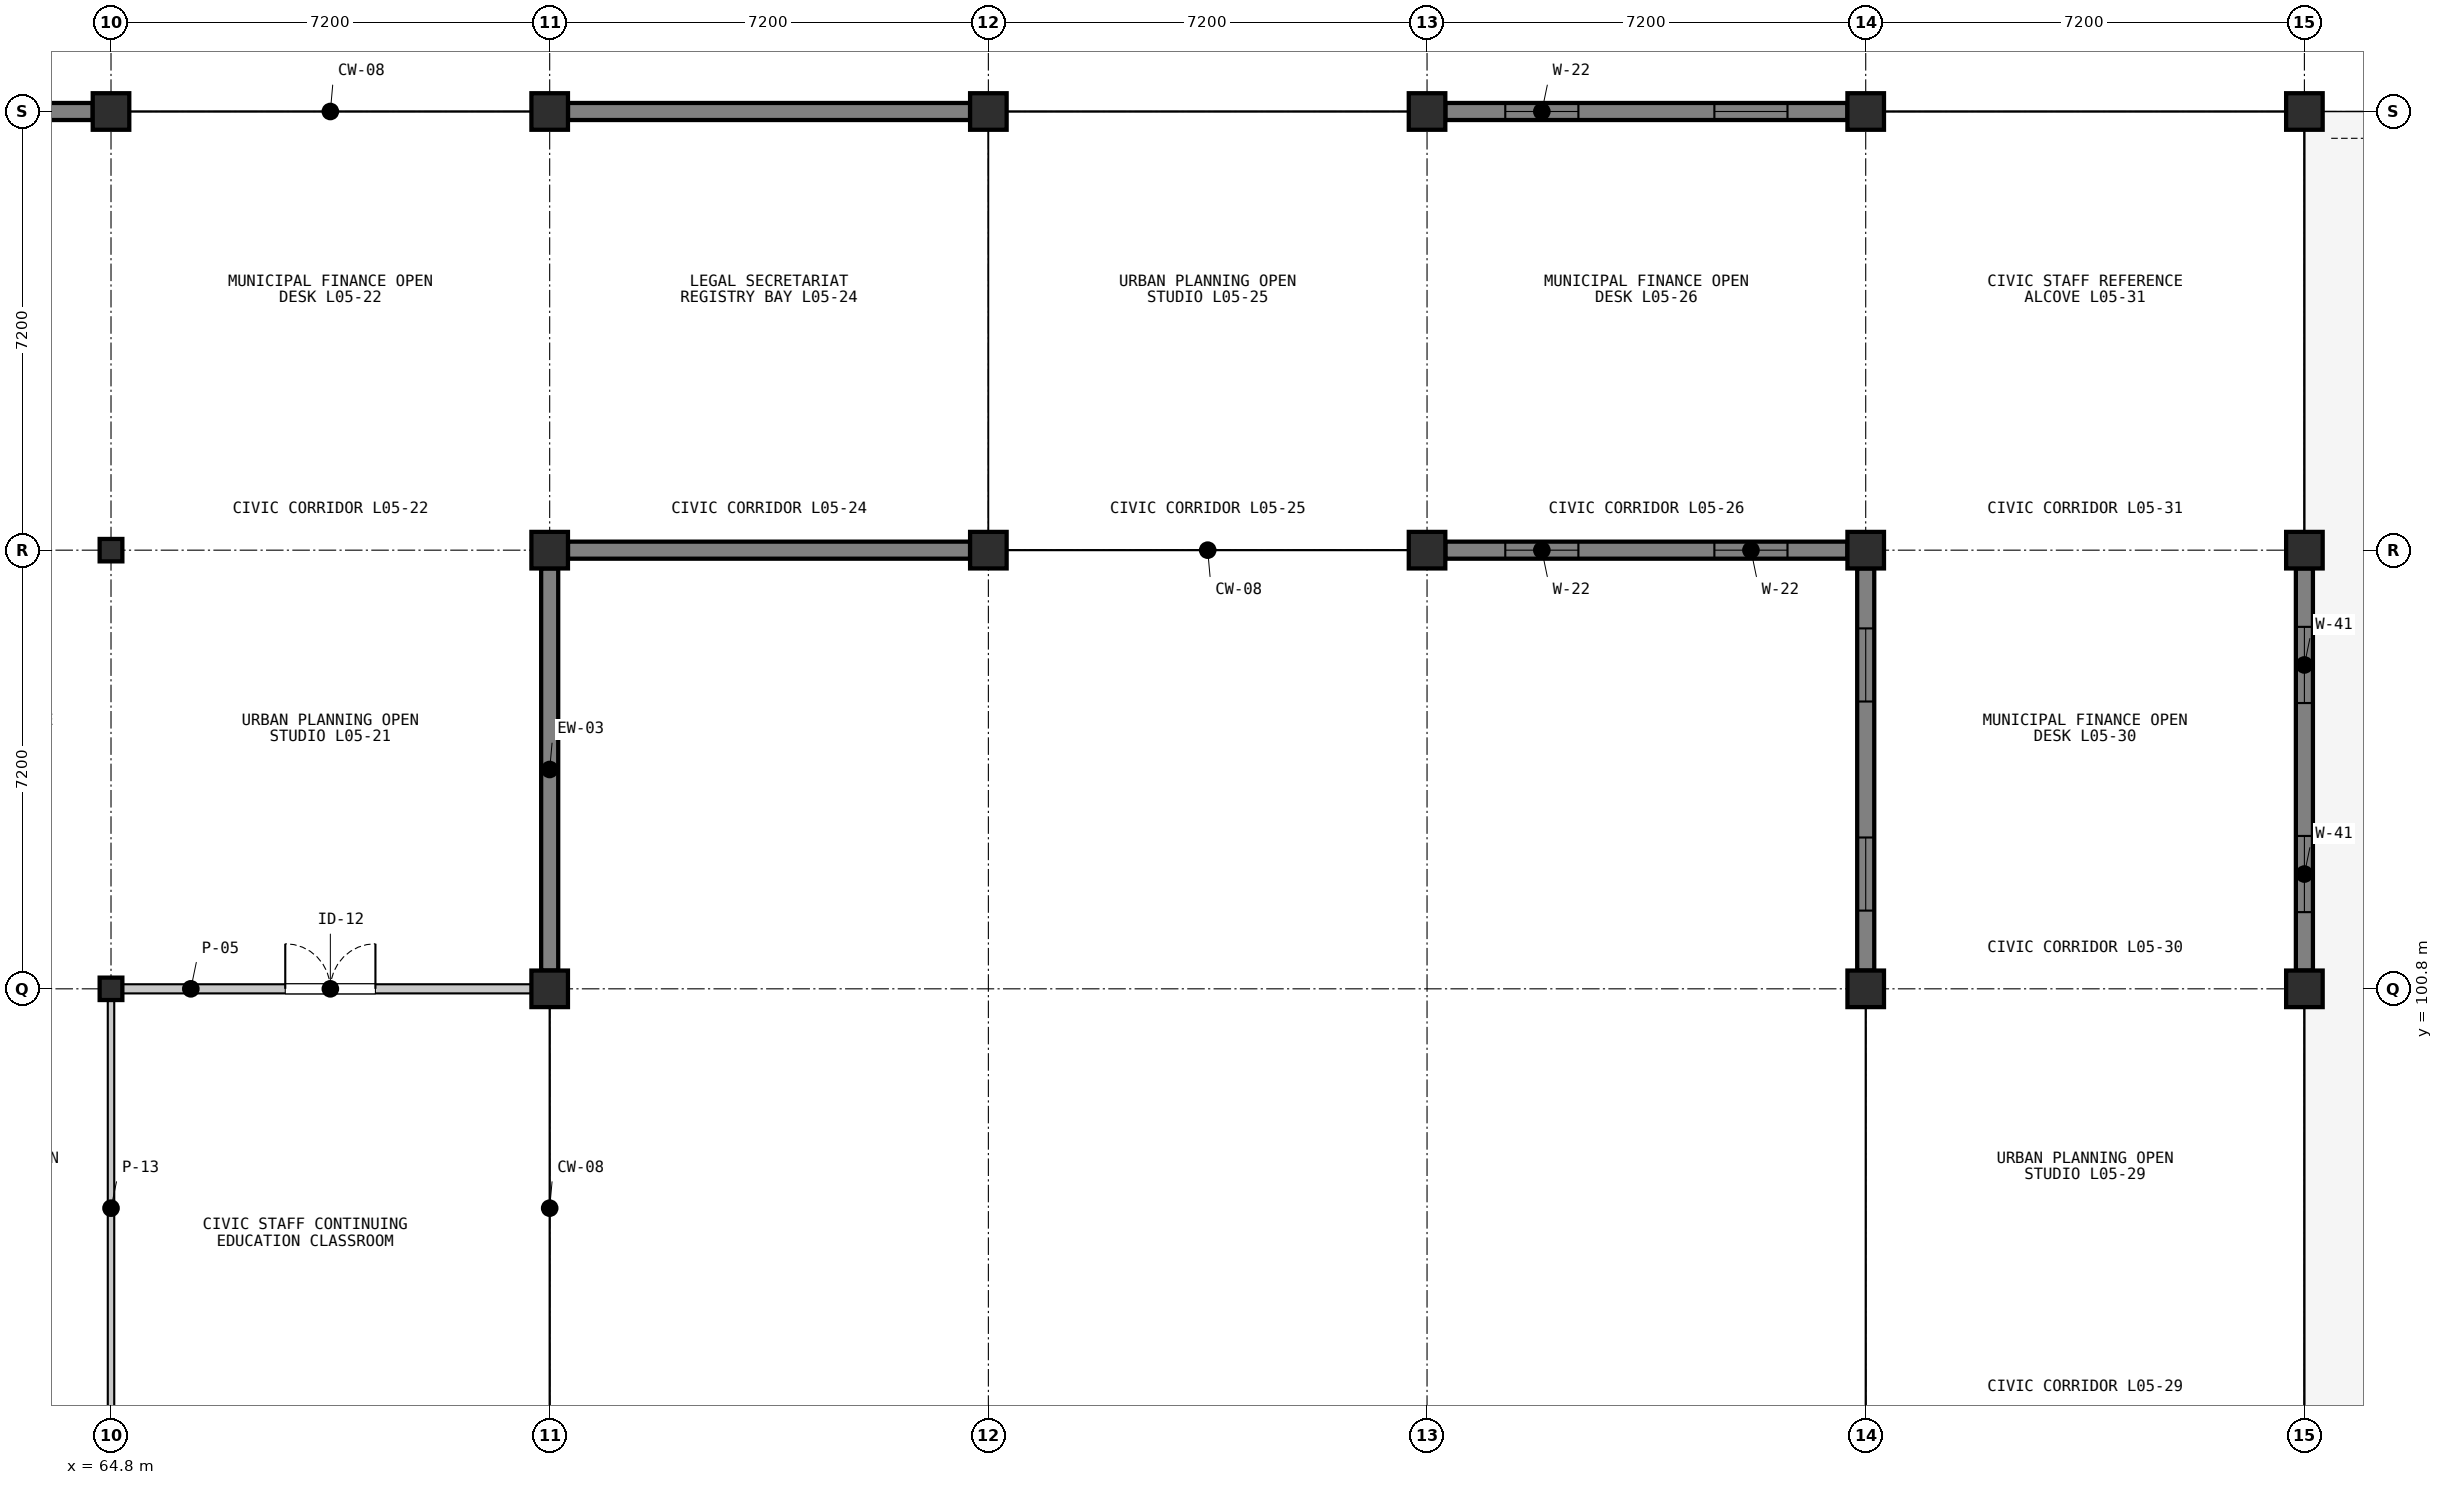
"""IFC4 building model, lengths in metres.
Left out: names, types, materials, properties, quantities, classifications, styles, units other than length and angle.
Written with IfcOpenShell. Run it as: python <this file> out.ifc"""

import sys

from ifc_helpers import new_model, si_unit, direction, frame, frame_2d, origin, origin_2d, place, context, subcontext, project, spatial, rectangle, i_section, extrude, element, fill, save


model = new_model("IFC4")
c1 = context("Model", 3, precision=1e-05, world=origin(), true_north=direction((0.0, 1.0)))
c2 = subcontext(c1, "Body", "Model", "MODEL_VIEW")
j1 = project(units=[si_unit("LENGTHUNIT", "METRE"), si_unit("PLANEANGLEUNIT", "RADIAN")], contexts=[c1])
p1 = place(None, origin())
s1 = spatial("IfcSite", under=j1, at=p1, CompositionType="ELEMENT")
p2 = place(p1, origin())
s2 = spatial("IfcBuilding", under=s1, at=p2, CompositionType="ELEMENT")
p3 = place(p2, frame((0.0, 0.0, 18.0)))
s3 = spatial("IfcBuildingStorey", under=s2, at=p3, CompositionType="ELEMENT", Elevation=18.0)
for number, where, z_axis, x_axis in (
    (1, (64.8, 100.8, 0.0), (0.0, 0.0, 1.0), (1.0, 0.0, 0.0)),
    (2, (64.8, 108.0, 0.0), (0.0, 0.0, 1.0), (1.0, 0.0, 0.0)),
):
    element("IfcColumn", number, at=place(p3, frame(where, z_axis=z_axis, x_axis=x_axis)), inside=s3, PredefinedType="COLUMN", context=c2, shape_type="SweptSolid", body=[
        extrude(i_section(OverallWidth=0.373, OverallDepth=0.368, WebThickness=0.015, FlangeThickness=0.024, FilletRadius=0.015, at=origin_2d()), origin(), (0.0, 0.0, 1.0), 3.9),
    ])
for number, where, z_axis, x_axis in (
    (3, (64.8, 115.2, 0.0), (0.0, 0.0, 1.0), (1.0, 0.0, 0.0)),
    (4, (72.0, 100.8, 0.0), (0.0, 0.0, 1.0), (1.0, 0.0, 0.0)),
    (5, (72.0, 108.0, 0.0), (0.0, 0.0, 1.0), (1.0, 0.0, 0.0)),
    (6, (72.0, 115.2, 0.0), (0.0, 0.0, 1.0), (1.0, 0.0, 0.0)),
    (7, (79.2, 108.0, 0.0), (0.0, 0.0, 1.0), (1.0, 0.0, 0.0)),
    (8, (79.2, 115.2, 0.0), (0.0, 0.0, 1.0), (1.0, 0.0, 0.0)),
    (9, (86.4, 108.0, 0.0), (0.0, 0.0, 1.0), (1.0, 0.0, 0.0)),
    (10, (86.4, 115.2, 0.0), (0.0, 0.0, 1.0), (1.0, 0.0, 0.0)),
    (11, (93.6, 100.8, 0.0), (0.0, 0.0, 1.0), (1.0, 0.0, 0.0)),
    (12, (93.6, 108.0, 0.0), (0.0, 0.0, 1.0), (1.0, 0.0, 0.0)),
    (13, (93.6, 115.2, 0.0), (0.0, 0.0, 1.0), (1.0, 0.0, 0.0)),
    (14, (100.8, 100.8, 0.0), (0.0, 0.0, 1.0), (1.0, 0.0, 0.0)),
    (15, (100.8, 108.0, 0.0), (0.0, 0.0, 1.0), (1.0, 0.0, 0.0)),
    (16, (100.8, 115.2, 0.0), (0.0, 0.0, 1.0), (1.0, 0.0, 0.0)),
):
    element("IfcColumn", number, at=place(p3, frame(where, z_axis=z_axis, x_axis=x_axis)), inside=s3, PredefinedType="COLUMN", context=c2, shape_type="SweptSolid", body=[
        extrude(rectangle(XDim=0.6, YDim=0.6, at=origin_2d()), origin(), (0.0, 0.0, 1.0), 3.9),
    ])
p4 = place(p3, frame((57.9, 115.2, 0.0), z_axis=(0.0, 0.0, 1.0), x_axis=(1.0, 0.0, 0.0)))
e17 = element("IfcWall", 17, at=p4, inside=s3, PredefinedType="SOLIDWALL", context=c2, shape_type="SweptSolid", body=[
    extrude(rectangle(XDim=6.6, YDim=0.28, at=frame_2d((3.3, 0.0))), origin(), (0.0, 0.0, 1.0), 3.192),
])
for number, where, z_axis, x_axis in (
    (18, (72.0, 107.7, 0.0), (0.0, 0.0, 1.0), (0.0, -1.0, 0.0)),
    (19, (78.9, 108.0, 0.0), (0.0, 0.0, 1.0), (-1.0, 0.0, 0.0)),
    (20, (72.3, 115.2, 0.0), (0.0, 0.0, 1.0), (1.0, 0.0, 0.0)),
):
    element("IfcWall", number, at=place(p3, frame(where, z_axis=z_axis, x_axis=x_axis)), inside=s3, PredefinedType="SOLIDWALL", context=c2, shape_type="SweptSolid", body=[
        extrude(rectangle(XDim=6.6, YDim=0.28, at=frame_2d((3.3, 0.0))), origin(), (0.0, 0.0, 1.0), 3.192),
    ])
p5 = place(p3, frame((93.3, 108.0, 0.0), z_axis=(0.0, 0.0, 1.0), x_axis=(-1.0, 0.0, 0.0)))
e21 = element("IfcWall", 21, at=p5, inside=s3, PredefinedType="SOLIDWALL", context=c2, shape_type="SweptSolid", body=[
    extrude(rectangle(XDim=6.6, YDim=0.28, at=frame_2d((3.3, 0.0))), origin(), (0.0, 0.0, 1.0), 3.192),
])
p6 = place(p5, frame((0.984, 0.0, 0.95)))
e22 = element("IfcOpeningElement", 22, at=p6, cuts=e21, PredefinedType="OPENING", context=c2, shape_type="SweptSolid", body=[
    extrude(rectangle(XDim=1.2, YDim=1.7, at=frame_2d((0.6, 0.85))), frame((0.0, 0.15, 0.0), z_axis=(0.0, -1.0, 0.0), x_axis=(1.0, 0.0, 0.0)), (0.0, 0.0, 1.0), 0.3),
])
p7 = place(p5, frame((4.416, 0.0, 0.95)))
e23 = element("IfcOpeningElement", 23, at=p7, cuts=e21, PredefinedType="OPENING", context=c2, shape_type="SweptSolid", body=[
    extrude(rectangle(XDim=1.2, YDim=1.7, at=frame_2d((0.6, 0.85))), frame((0.0, 0.15, 0.0), z_axis=(0.0, -1.0, 0.0), x_axis=(1.0, 0.0, 0.0)), (0.0, 0.0, 1.0), 0.3),
])
p8 = place(p3, frame((86.7, 115.2, 0.0), z_axis=(0.0, 0.0, 1.0), x_axis=(1.0, 0.0, 0.0)))
e24 = element("IfcWall", 24, at=p8, inside=s3, PredefinedType="SOLIDWALL", context=c2, shape_type="SweptSolid", body=[
    extrude(rectangle(XDim=6.6, YDim=0.28, at=frame_2d((3.3, 0.0))), origin(), (0.0, 0.0, 1.0), 3.192),
])
p9 = place(p8, frame((0.984, 0.0, 0.95)))
e25 = element("IfcOpeningElement", 25, at=p9, cuts=e24, PredefinedType="OPENING", context=c2, shape_type="SweptSolid", body=[
    extrude(rectangle(XDim=1.2, YDim=1.7, at=frame_2d((0.6, 0.85))), frame((0.0, 0.15, 0.0), z_axis=(0.0, -1.0, 0.0), x_axis=(1.0, 0.0, 0.0)), (0.0, 0.0, 1.0), 0.3),
])
p10 = place(p8, frame((4.416, 0.0, 0.95)))
e26 = element("IfcOpeningElement", 26, at=p10, cuts=e24, PredefinedType="OPENING", context=c2, shape_type="SweptSolid", body=[
    extrude(rectangle(XDim=1.2, YDim=1.7, at=frame_2d((0.6, 0.85))), frame((0.0, 0.15, 0.0), z_axis=(0.0, -1.0, 0.0), x_axis=(1.0, 0.0, 0.0)), (0.0, 0.0, 1.0), 0.3),
])
p11 = place(p3, frame((93.6, 101.1, 0.0), z_axis=(0.0, 0.0, 1.0), x_axis=(0.0, 1.0, 0.0)))
e27 = element("IfcWall", 27, at=p11, inside=s3, PredefinedType="SOLIDWALL", context=c2, shape_type="SweptSolid", body=[
    extrude(rectangle(XDim=6.6, YDim=0.28, at=frame_2d((3.3, 0.0))), origin(), (0.0, 0.0, 1.0), 3.192),
])
p12 = place(p11, frame((0.984, 0.0, 0.95)))
e28 = element("IfcOpeningElement", 28, at=p12, cuts=e27, PredefinedType="OPENING", context=c2, shape_type="SweptSolid", body=[
    extrude(rectangle(XDim=1.2, YDim=1.7, at=frame_2d((0.6, 0.85))), frame((0.0, 0.15, 0.0), z_axis=(0.0, -1.0, 0.0), x_axis=(1.0, 0.0, 0.0)), (0.0, 0.0, 1.0), 0.3),
])
p13 = place(p11, frame((4.416, 0.0, 0.95)))
e29 = element("IfcOpeningElement", 29, at=p13, cuts=e27, PredefinedType="OPENING", context=c2, shape_type="SweptSolid", body=[
    extrude(rectangle(XDim=1.2, YDim=1.7, at=frame_2d((0.6, 0.85))), frame((0.0, 0.15, 0.0), z_axis=(0.0, -1.0, 0.0), x_axis=(1.0, 0.0, 0.0)), (0.0, 0.0, 1.0), 0.3),
])
p14 = place(p3, frame((100.8, 107.7, 0.0), z_axis=(0.0, 0.0, 1.0), x_axis=(0.0, -1.0, 0.0)))
e30 = element("IfcWall", 30, at=p14, inside=s3, PredefinedType="SOLIDWALL", context=c2, shape_type="SweptSolid", body=[
    extrude(rectangle(XDim=6.6, YDim=0.28, at=frame_2d((3.3, 0.0))), origin(), (0.0, 0.0, 1.0), 3.192),
])
p15 = place(p14, frame((0.959, 0.0, 0.95)))
e31 = element("IfcOpeningElement", 31, at=p15, cuts=e30, PredefinedType="OPENING", context=c2, shape_type="SweptSolid", body=[
    extrude(rectangle(XDim=1.25, YDim=1.85, at=frame_2d((0.625, 0.925))), frame((0.0, 0.15, 0.0), z_axis=(0.0, -1.0, 0.0), x_axis=(1.0, 0.0, 0.0)), (0.0, 0.0, 1.0), 0.3),
])
p16 = place(p14, frame((4.391, 0.0, 0.95)))
e32 = element("IfcOpeningElement", 32, at=p16, cuts=e30, PredefinedType="OPENING", context=c2, shape_type="SweptSolid", body=[
    extrude(rectangle(XDim=1.25, YDim=1.85, at=frame_2d((0.625, 0.925))), frame((0.0, 0.15, 0.0), z_axis=(0.0, -1.0, 0.0), x_axis=(1.0, 0.0, 0.0)), (0.0, 0.0, 1.0), 0.3),
])
p17 = place(p3, frame((64.92, 100.8, 0.0), z_axis=(0.0, 0.0, 1.0), x_axis=(1.0, 0.0, 0.0)))
e33 = element("IfcWall", 33, at=p17, inside=s3, PredefinedType="PARTITIONING", context=c2, shape_type="SweptSolid", body=[
    extrude(rectangle(XDim=6.96, YDim=0.15, at=frame_2d((3.48, 0.0))), origin(), (0.0, 0.0, 1.0), 3.108),
])
p18 = place(p17, frame((2.74, 0.0, 0.0)))
e34 = element("IfcOpeningElement", 34, at=p18, cuts=e33, PredefinedType="OPENING", context=c2, shape_type="SweptSolid", body=[
    extrude(rectangle(XDim=1.48, YDim=2.25, at=frame_2d((0.74, 1.125))), frame((0.0, 0.085, 0.0), z_axis=(0.0, -1.0, 0.0), x_axis=(1.0, 0.0, 0.0)), (0.0, 0.0, 1.0), 0.17),
])
p19 = place(p3, frame((64.8, 93.72, 0.0), z_axis=(0.0, 0.0, 1.0), x_axis=(0.0, 1.0, 0.0)))
e35 = element("IfcWall", 35, at=p19, inside=s3, PredefinedType="PARTITIONING", context=c2, shape_type="SweptSolid", body=[
    extrude(rectangle(XDim=6.96, YDim=0.106, at=frame_2d((3.48, 0.0))), origin(), (0.0, 0.0, 1.0), 3.108),
])
p20 = place(p6, origin())
e36 = element("IfcWindow", 36, at=p20, inside=s3, PartitioningType="SINGLE_PANEL", PredefinedType="WINDOW", context=c2, shape_type="SweptSolid", body=[
    extrude(rectangle(XDim=1.2, YDim=1.7, at=frame_2d((0.6, 0.85))), frame((0.0, 0.03, 0.0), z_axis=(0.0, -1.0, 0.0), x_axis=(1.0, 0.0, 0.0)), (0.0, 0.0, 1.0), 0.06),
])
fill(e22, e36)
p21 = place(p7, origin())
e37 = element("IfcWindow", 37, at=p21, inside=s3, PartitioningType="SINGLE_PANEL", PredefinedType="WINDOW", context=c2, shape_type="SweptSolid", body=[
    extrude(rectangle(XDim=1.2, YDim=1.7, at=frame_2d((0.6, 0.85))), frame((0.0, 0.03, 0.0), z_axis=(0.0, -1.0, 0.0), x_axis=(1.0, 0.0, 0.0)), (0.0, 0.0, 1.0), 0.06),
])
fill(e23, e37)
p22 = place(p9, origin())
e38 = element("IfcWindow", 38, at=p22, inside=s3, PartitioningType="SINGLE_PANEL", PredefinedType="WINDOW", context=c2, shape_type="SweptSolid", body=[
    extrude(rectangle(XDim=1.2, YDim=1.7, at=frame_2d((0.6, 0.85))), frame((0.0, 0.03, 0.0), z_axis=(0.0, -1.0, 0.0), x_axis=(1.0, 0.0, 0.0)), (0.0, 0.0, 1.0), 0.06),
])
fill(e25, e38)
p23 = place(p10, origin())
e39 = element("IfcWindow", 39, at=p23, inside=s3, PartitioningType="SINGLE_PANEL", PredefinedType="WINDOW", context=c2, shape_type="SweptSolid", body=[
    extrude(rectangle(XDim=1.2, YDim=1.7, at=frame_2d((0.6, 0.85))), frame((0.0, 0.03, 0.0), z_axis=(0.0, -1.0, 0.0), x_axis=(1.0, 0.0, 0.0)), (0.0, 0.0, 1.0), 0.06),
])
fill(e26, e39)
p24 = place(p12, origin())
e40 = element("IfcWindow", 40, at=p24, inside=s3, PartitioningType="SINGLE_PANEL", PredefinedType="WINDOW", context=c2, shape_type="SweptSolid", body=[
    extrude(rectangle(XDim=1.2, YDim=1.7, at=frame_2d((0.6, 0.85))), frame((0.0, 0.03, 0.0), z_axis=(0.0, -1.0, 0.0), x_axis=(1.0, 0.0, 0.0)), (0.0, 0.0, 1.0), 0.06),
])
fill(e28, e40)
p25 = place(p13, origin())
e41 = element("IfcWindow", 41, at=p25, inside=s3, PartitioningType="SINGLE_PANEL", PredefinedType="WINDOW", context=c2, shape_type="SweptSolid", body=[
    extrude(rectangle(XDim=1.2, YDim=1.7, at=frame_2d((0.6, 0.85))), frame((0.0, 0.03, 0.0), z_axis=(0.0, -1.0, 0.0), x_axis=(1.0, 0.0, 0.0)), (0.0, 0.0, 1.0), 0.06),
])
fill(e29, e41)
p26 = place(p15, origin())
e42 = element("IfcWindow", 42, at=p26, inside=s3, PartitioningType="SINGLE_PANEL", PredefinedType="WINDOW", context=c2, shape_type="SweptSolid", body=[
    extrude(rectangle(XDim=1.25, YDim=1.85, at=frame_2d((0.625, 0.925))), frame((0.0, 0.03, 0.0), z_axis=(0.0, -1.0, 0.0), x_axis=(1.0, 0.0, 0.0)), (0.0, 0.0, 1.0), 0.06),
])
fill(e31, e42)
p27 = place(p16, origin())
e43 = element("IfcWindow", 43, at=p27, inside=s3, PartitioningType="SINGLE_PANEL", PredefinedType="WINDOW", context=c2, shape_type="SweptSolid", body=[
    extrude(rectangle(XDim=1.25, YDim=1.85, at=frame_2d((0.625, 0.925))), frame((0.0, 0.03, 0.0), z_axis=(0.0, -1.0, 0.0), x_axis=(1.0, 0.0, 0.0)), (0.0, 0.0, 1.0), 0.06),
])
fill(e32, e43)
p28 = place(p18, origin())
e44 = element("IfcDoor", 44, at=p28, inside=s3, OperationType="DOUBLE_DOOR_SINGLE_SWING", PredefinedType="DOOR", context=c2, shape_type="SweptSolid", body=[
    extrude(rectangle(XDim=1.48, YDim=2.25, at=frame_2d((0.74, 1.125))), frame((0.0, 0.025, 0.0), z_axis=(0.0, -1.0, 0.0), x_axis=(1.0, 0.0, 0.0)), (0.0, 0.0, 1.0), 0.05),
])
fill(e34, e44)
save(model, sys.argv[1])
